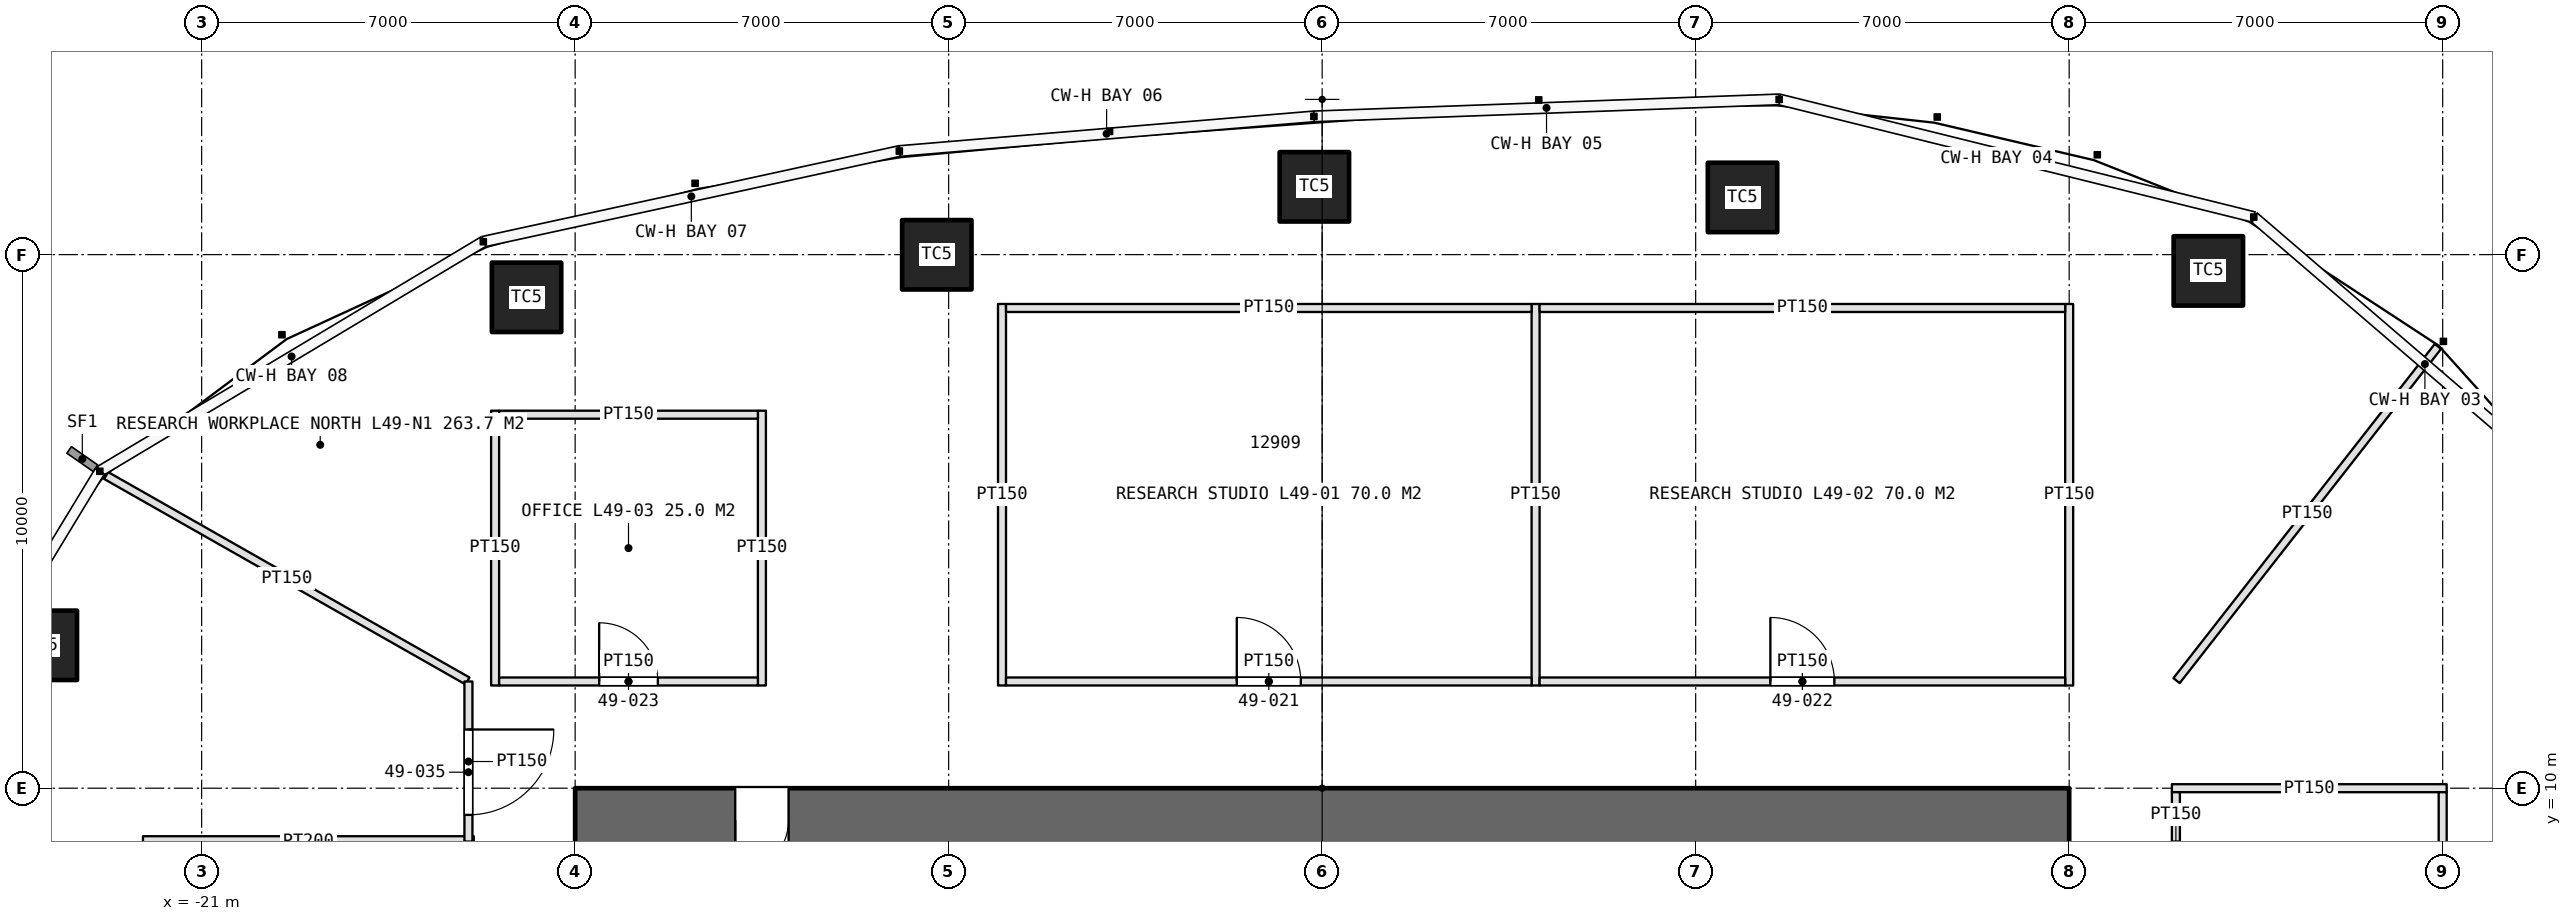
"""IFC4 building model, lengths in metres.
Left out: names, types, materials, properties, quantities, classifications, styles, units other than length and angle.
Written with IfcOpenShell. Run it as: python <this file> out.ifc"""

import sys

from ifc_helpers import new_model, si_unit, direction, frame, frame_2d, origin, origin_2d, place, context, subcontext, project, spatial, rectangle, extrude, element, fill, save


model = new_model("IFC4")
c1 = context("Model", 3, precision=1e-05, world=origin(), true_north=direction((0.0, 1.0)))
c2 = subcontext(c1, "Body", "Model", "MODEL_VIEW")
j1 = project(units=[si_unit("LENGTHUNIT", "METRE"), si_unit("PLANEANGLEUNIT", "RADIAN")], contexts=[c1])
p1 = place(None, origin())
s1 = spatial("IfcSite", under=j1, at=p1, CompositionType="ELEMENT")
p2 = place(p1, origin())
s2 = spatial("IfcBuilding", under=s1, at=p2, CompositionType="ELEMENT")
p3 = place(p2, frame((0.0, 0.0, 224.2)))
s3 = spatial("IfcBuildingStorey", under=s2, at=p3, CompositionType="ELEMENT", Elevation=224.2)
p4 = place(p3, frame((14.0, 9.4, 0.0), z_axis=(0.0, 0.0, 1.0), x_axis=(-1.0, 0.0, 0.0)))
e1 = element("IfcWall", 1, at=p4, inside=s3, PredefinedType="SHEAR", context=c2, shape_type="SweptSolid", body=[
    extrude(rectangle(XDim=28.0, YDim=1.2, at=frame_2d((14.0, 0.0))), origin(), (0.0, 0.0, 1.0), 4.2),
])
p5 = place(p4, frame((24.0, 0.0, 0.0)))
e2 = element("IfcOpeningElement", 2, at=p5, cuts=e1, PredefinedType="OPENING", context=c2, shape_type="SweptSolid", body=[
    extrude(rectangle(XDim=1.0, YDim=2.4, at=frame_2d((0.5, 1.2))), frame((0.0, 0.61, 0.0), z_axis=(0.0, -1.0, 0.0), x_axis=(1.0, 0.0, 0.0)), (0.0, 0.0, 1.0), 1.22),
])
for number, where, z_axis, x_axis in (
    (3, (16.608, 19.695, 0.0), (0.0, 0.0, 1.0), (1.0, 0.0, 0.0)),
    (4, (7.878, 21.072, 0.0), (0.0, 0.0, 1.0), (1.0, 0.0, 0.0)),
    (5, (-0.146, 21.271, 0.0), (0.0, 0.0, 1.0), (1.0, 0.0, 0.0)),
    (6, (-7.222, 19.997, 0.0), (0.0, 0.0, 1.0), (1.0, 0.0, 0.0)),
    (7, (-14.911, 19.2, 0.0), (0.0, 0.0, 1.0), (1.0, 0.0, 0.0)),
    (8, (-23.986, 12.678, 0.0), (0.0, 0.0, 1.0), (1.0, 0.0, 0.0)),
):
    element("IfcColumn", number, at=place(p3, frame(where, z_axis=z_axis, x_axis=x_axis)), inside=s3, PredefinedType="COLUMN", context=c2, shape_type="SweptSolid", body=[
        extrude(rectangle(XDim=1.3, YDim=1.3, at=origin_2d()), origin(), (0.0, 0.0, 1.0), 4.2),
    ])
for number, where, z_axis, x_axis in (
    (9, (-6.0, 11.925, 0.0), (0.0, 0.0, 1.0), (0.0, 1.0, 0.0)),
    (10, (4.0, 11.925, 0.0), (0.0, 0.0, 1.0), (0.0, 1.0, 0.0)),
    (11, (14.0, 11.925, 0.0), (0.0, 0.0, 1.0), (0.0, 1.0, 0.0)),
):
    element("IfcWall", number, at=place(p3, frame(where, z_axis=z_axis, x_axis=x_axis)), inside=s3, PredefinedType="PARTITIONING", context=c2, shape_type="SweptSolid", body=[
        extrude(rectangle(XDim=7.15, YDim=0.15, at=frame_2d((3.575, 0.0))), origin(), (0.0, 0.0, 1.0), 3.0),
    ])
p6 = place(p3, frame((-5.925, 12.0, 0.0), z_axis=(0.0, 0.0, 1.0), x_axis=(1.0, 0.0, 0.0)))
e12 = element("IfcWall", 12, at=p6, inside=s3, PredefinedType="PARTITIONING", context=c2, shape_type="SweptSolid", body=[
    extrude(rectangle(XDim=9.85, YDim=0.15, at=frame_2d((4.925, 0.0))), origin(), (0.0, 0.0, 1.0), 3.0),
])
p7 = place(p6, frame((4.325, 0.0, 0.0)))
e13 = element("IfcOpeningElement", 13, at=p7, cuts=e12, PredefinedType="OPENING", context=c2, shape_type="SweptSolid", body=[
    extrude(rectangle(XDim=1.2, YDim=2.4, at=frame_2d((0.6, 1.2))), frame((0.0, 0.085, 0.0), z_axis=(0.0, -1.0, 0.0), x_axis=(1.0, 0.0, 0.0)), (0.0, 0.0, 1.0), 0.17),
])
p8 = place(p3, frame((-5.925, 19.0, 0.0), z_axis=(0.0, 0.0, 1.0), x_axis=(1.0, 0.0, 0.0)))
e14 = element("IfcWall", 14, at=p8, inside=s3, PredefinedType="PARTITIONING", context=c2, shape_type="SweptSolid", body=[
    extrude(rectangle(XDim=9.85, YDim=0.15, at=frame_2d((4.925, 0.0))), origin(), (0.0, 0.0, 1.0), 3.0),
])
p9 = place(p3, frame((4.075, 12.0, 0.0), z_axis=(0.0, 0.0, 1.0), x_axis=(1.0, 0.0, 0.0)))
e15 = element("IfcWall", 15, at=p9, inside=s3, PredefinedType="PARTITIONING", context=c2, shape_type="SweptSolid", body=[
    extrude(rectangle(XDim=9.85, YDim=0.15, at=frame_2d((4.925, 0.0))), origin(), (0.0, 0.0, 1.0), 3.0),
])
p10 = place(p9, frame((4.325, 0.0, 0.0)))
e16 = element("IfcOpeningElement", 16, at=p10, cuts=e15, PredefinedType="OPENING", context=c2, shape_type="SweptSolid", body=[
    extrude(rectangle(XDim=1.2, YDim=2.4, at=frame_2d((0.6, 1.2))), frame((0.0, 0.085, 0.0), z_axis=(0.0, -1.0, 0.0), x_axis=(1.0, 0.0, 0.0)), (0.0, 0.0, 1.0), 0.17),
])
p11 = place(p3, frame((4.075, 19.0, 0.0), z_axis=(0.0, 0.0, 1.0), x_axis=(1.0, 0.0, 0.0)))
e17 = element("IfcWall", 17, at=p11, inside=s3, PredefinedType="PARTITIONING", context=c2, shape_type="SweptSolid", body=[
    extrude(rectangle(XDim=9.85, YDim=0.15, at=frame_2d((4.925, 0.0))), origin(), (0.0, 0.0, 1.0), 3.0),
])
for number, where, z_axis, x_axis in (
    (18, (-15.5, 11.925, 0.0), (0.0, 0.0, 1.0), (0.0, 1.0, 0.0)),
    (19, (-10.5, 11.925, 0.0), (0.0, 0.0, 1.0), (0.0, 1.0, 0.0)),
):
    element("IfcWall", number, at=place(p3, frame(where, z_axis=z_axis, x_axis=x_axis)), inside=s3, PredefinedType="PARTITIONING", context=c2, shape_type="SweptSolid", body=[
        extrude(rectangle(XDim=5.15, YDim=0.15, at=frame_2d((2.575, 0.0))), origin(), (0.0, 0.0, 1.0), 3.0),
    ])
p12 = place(p3, frame((-15.425, 12.0, 0.0), z_axis=(0.0, 0.0, 1.0), x_axis=(1.0, 0.0, 0.0)))
e20 = element("IfcWall", 20, at=p12, inside=s3, PredefinedType="PARTITIONING", context=c2, shape_type="SweptSolid", body=[
    extrude(rectangle(XDim=4.85, YDim=0.15, at=frame_2d((2.425, 0.0))), origin(), (0.0, 0.0, 1.0), 3.0),
])
p13 = place(p12, frame((1.875, 0.0, 0.0)))
e21 = element("IfcOpeningElement", 21, at=p13, cuts=e20, PredefinedType="OPENING", context=c2, shape_type="SweptSolid", body=[
    extrude(rectangle(XDim=1.1, YDim=2.3, at=frame_2d((0.55, 1.15))), frame((0.0, 0.085, 0.0), z_axis=(0.0, -1.0, 0.0), x_axis=(1.0, 0.0, 0.0)), (0.0, 0.0, 1.0), 0.17),
])
p14 = place(p3, frame((-15.425, 17.0, 0.0), z_axis=(0.0, 0.0, 1.0), x_axis=(1.0, 0.0, 0.0)))
e22 = element("IfcWall", 22, at=p14, inside=s3, PredefinedType="PARTITIONING", context=c2, shape_type="SweptSolid", body=[
    extrude(rectangle(XDim=4.85, YDim=0.15, at=frame_2d((2.425, 0.0))), origin(), (0.0, 0.0, 1.0), 3.0),
])
p15 = place(p3, frame((-15.9, 9.0, 0.0), z_axis=(0.0, 0.0, 1.0), x_axis=(-1.0, 0.0, 0.0)))
e23 = element("IfcWall", 23, at=p15, inside=s3, PredefinedType="PARTITIONING", context=c2, shape_type="SweptSolid", body=[
    extrude(rectangle(XDim=6.2, YDim=0.2, at=frame_2d((3.1, 0.0))), origin(), (0.0, 0.0, 1.0), 3.0),
])
p16 = place(p3, frame((15.925, 10.0, 0.0), z_axis=(0.0, 0.0, 1.0), x_axis=(1.0, 0.0, 0.0)))
e24 = element("IfcWall", 24, at=p16, inside=s3, PredefinedType="PARTITIONING", context=c2, shape_type="SweptSolid", body=[
    extrude(rectangle(XDim=5.15, YDim=0.15, at=frame_2d((2.575, 0.0))), origin(), (0.0, 0.0, 1.0), 3.0),
])
p17 = place(p3, frame((16.0, 7.075, 0.0), z_axis=(0.0, 0.0, 1.0), x_axis=(0.0, 1.0, 0.0)))
e25 = element("IfcWall", 25, at=p17, inside=s3, PredefinedType="PARTITIONING", context=c2, shape_type="SweptSolid", body=[
    extrude(rectangle(XDim=2.85, YDim=0.15, at=frame_2d((1.425, 0.0))), origin(), (0.0, 0.0, 1.0), 3.0),
])
p18 = place(p17, frame((0.925, 0.0, 0.0)))
e26 = element("IfcOpeningElement", 26, at=p18, cuts=e25, PredefinedType="OPENING", context=c2, shape_type="SweptSolid", body=[
    extrude(rectangle(XDim=1.0, YDim=2.2, at=frame_2d((0.5, 1.1))), frame((0.0, 0.085, 0.0), z_axis=(0.0, -1.0, 0.0), x_axis=(1.0, 0.0, 0.0)), (0.0, 0.0, 1.0), 0.17),
])
p19 = place(p3, frame((21.0, 7.075, 0.0), z_axis=(0.0, 0.0, 1.0), x_axis=(0.0, 1.0, 0.0)))
e27 = element("IfcWall", 27, at=p19, inside=s3, PredefinedType="PARTITIONING", context=c2, shape_type="SweptSolid", body=[
    extrude(rectangle(XDim=2.85, YDim=0.15, at=frame_2d((1.425, 0.0))), origin(), (0.0, 0.0, 1.0), 3.0),
])
p20 = place(p3, frame((-16.017, 12.01, 0.0), z_axis=(0.0, 0.0, 1.0), x_axis=(-0.869357432803, 0.494183826151, 0.0)))
e28 = element("IfcWall", 28, at=p20, inside=s3, PredefinedType="PARTITIONING", context=c2, shape_type="SweptSolid", body=[
    extrude(rectangle(XDim=7.791, YDim=0.15, at=frame_2d((3.896, 0.0))), origin(), (0.0, 0.0, 1.0), 3.0),
])
p21 = place(p3, frame((16.012, 12.016, 0.0), z_axis=(0.0, 0.0, 1.0), x_axis=(0.616030058222, 0.787722646219, 0.0)))
e29 = element("IfcWall", 29, at=p21, inside=s3, PredefinedType="PARTITIONING", context=c2, shape_type="SweptSolid", body=[
    extrude(rectangle(XDim=7.952, YDim=0.15, at=frame_2d((3.976, 0.0))), origin(), (0.0, 0.0, 1.0), 3.0),
])
p22 = place(p3, frame((-16.0, 12.0, 0.0), z_axis=(0.0, 0.0, 1.0), x_axis=(0.0, -1.0, 0.0)))
e30 = element("IfcWall", 30, at=p22, inside=s3, PredefinedType="PARTITIONING", context=c2, shape_type="SweptSolid", body=[
    extrude(rectangle(XDim=3.0, YDim=0.15, at=frame_2d((1.5, 0.0))), origin(), (0.0, 0.0, 1.0), 3.0),
])
p23 = place(p22, frame((0.9, 0.0, 0.0)))
e31 = element("IfcOpeningElement", 31, at=p23, cuts=e30, PredefinedType="OPENING", context=c2, shape_type="SweptSolid", body=[
    extrude(rectangle(XDim=1.6, YDim=2.4, at=frame_2d((0.8, 1.2))), frame((0.0, 0.085, 0.0), z_axis=(0.0, -1.0, 0.0), x_axis=(1.0, 0.0, 0.0)), (0.0, 0.0, 1.0), 0.17),
])
p24 = place(p5, origin())
e32 = element("IfcDoor", 32, at=p24, inside=s3, OperationType="SINGLE_SWING_RIGHT", PredefinedType="DOOR", context=c2, shape_type="SweptSolid", body=[
    extrude(rectangle(XDim=1.0, YDim=2.4, at=frame_2d((0.5, 1.2))), frame((0.0, 0.025, 0.0), z_axis=(0.0, -1.0, 0.0), x_axis=(1.0, 0.0, 0.0)), (0.0, 0.0, 1.0), 0.05),
])
fill(e2, e32)
p25 = place(p7, origin())
e33 = element("IfcDoor", 33, at=p25, inside=s3, OperationType="SINGLE_SWING_LEFT", PredefinedType="DOOR", context=c2, shape_type="SweptSolid", body=[
    extrude(rectangle(XDim=1.2, YDim=2.4, at=frame_2d((0.6, 1.2))), frame((0.0, 0.025, 0.0), z_axis=(0.0, -1.0, 0.0), x_axis=(1.0, 0.0, 0.0)), (0.0, 0.0, 1.0), 0.05),
])
fill(e13, e33)
p26 = place(p10, origin())
e34 = element("IfcDoor", 34, at=p26, inside=s3, OperationType="SINGLE_SWING_LEFT", PredefinedType="DOOR", context=c2, shape_type="SweptSolid", body=[
    extrude(rectangle(XDim=1.2, YDim=2.4, at=frame_2d((0.6, 1.2))), frame((0.0, 0.025, 0.0), z_axis=(0.0, -1.0, 0.0), x_axis=(1.0, 0.0, 0.0)), (0.0, 0.0, 1.0), 0.05),
])
fill(e16, e34)
p27 = place(p13, origin())
e35 = element("IfcDoor", 35, at=p27, inside=s3, OperationType="SINGLE_SWING_LEFT", PredefinedType="DOOR", context=c2, shape_type="SweptSolid", body=[
    extrude(rectangle(XDim=1.1, YDim=2.3, at=frame_2d((0.55, 1.15))), frame((0.0, 0.025, 0.0), z_axis=(0.0, -1.0, 0.0), x_axis=(1.0, 0.0, 0.0)), (0.0, 0.0, 1.0), 0.05),
])
fill(e21, e35)
p28 = place(p23, origin())
e36 = element("IfcDoor", 36, at=p28, inside=s3, OperationType="DOUBLE_DOOR_SINGLE_SWING", PredefinedType="DOOR", context=c2, shape_type="SweptSolid", body=[
    extrude(rectangle(XDim=1.6, YDim=2.4, at=frame_2d((0.8, 1.2))), frame((0.0, 0.025, 0.0), z_axis=(0.0, -1.0, 0.0), x_axis=(1.0, 0.0, 0.0)), (0.0, 0.0, 1.0), 0.05),
])
fill(e31, e36)
save(model, sys.argv[1])
